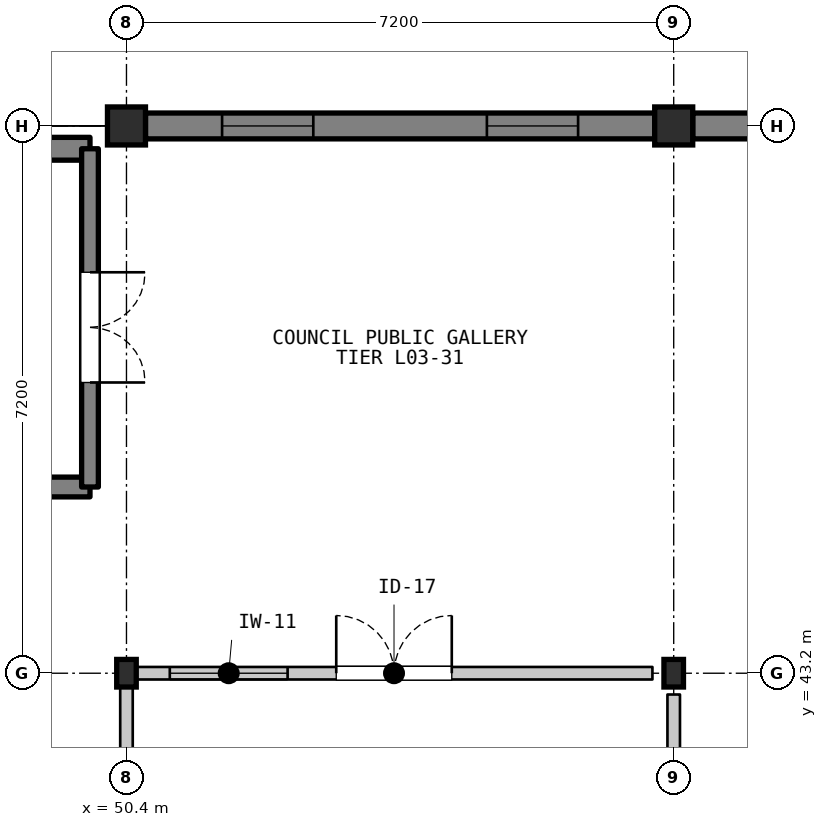
"""IFC4 building model, lengths in metres.
Left out: names, types, materials, properties, quantities, classifications, styles, units other than length and angle.
Written with IfcOpenShell. Run it as: python <this file> out.ifc"""

import sys

from ifc_helpers import new_model, si_unit, direction, frame, frame_2d, origin, origin_2d, place, context, subcontext, project, spatial, rectangle, i_section, extrude, element, fill, save


model = new_model("IFC4")
c1 = context("Model", 3, precision=1e-05, world=origin(), true_north=direction((0.0, 1.0)))
c2 = subcontext(c1, "Body", "Model", "MODEL_VIEW")
j1 = project(units=[si_unit("LENGTHUNIT", "METRE"), si_unit("PLANEANGLEUNIT", "RADIAN")], contexts=[c1])
p1 = place(None, origin())
s1 = spatial("IfcSite", under=j1, at=p1, CompositionType="ELEMENT")
p2 = place(p1, origin())
s2 = spatial("IfcBuilding", under=s1, at=p2, CompositionType="ELEMENT")
p3 = place(p2, frame((0.0, 0.0, 9.9)))
s3 = spatial("IfcBuildingStorey", under=s2, at=p3, CompositionType="ELEMENT", Elevation=9.9)
p4 = place(p3, frame((50.4, 43.2, 0.0), z_axis=(0.0, 0.0, 1.0), x_axis=(1.0, 0.0, 0.0)))
e1 = element("IfcColumn", 1, at=p4, inside=s3, PredefinedType="COLUMN", context=c2, shape_type="SweptSolid", body=[
    extrude(i_section(OverallWidth=0.257, OverallDepth=0.363, WebThickness=0.013, FlangeThickness=0.022, FilletRadius=0.015, at=origin_2d()), origin(), (0.0, 0.0, 1.0), 4.2),
])
p5 = place(p3, frame((50.4, 50.4, 0.0), z_axis=(0.0, 0.0, 1.0), x_axis=(1.0, 0.0, 0.0)))
e2 = element("IfcColumn", 2, at=p5, inside=s3, PredefinedType="COLUMN", context=c2, shape_type="SweptSolid", body=[
    extrude(rectangle(XDim=0.5, YDim=0.5, at=origin_2d()), origin(), (0.0, 0.0, 1.0), 4.2),
])
p6 = place(p3, frame((57.6, 43.2, 0.0), z_axis=(0.0, 0.0, 1.0), x_axis=(1.0, 0.0, 0.0)))
e3 = element("IfcColumn", 3, at=p6, inside=s3, PredefinedType="COLUMN", context=c2, shape_type="SweptSolid", body=[
    extrude(i_section(OverallWidth=0.257, OverallDepth=0.363, WebThickness=0.013, FlangeThickness=0.022, FilletRadius=0.015, at=origin_2d()), origin(), (0.0, 0.0, 1.0), 4.2),
])
p7 = place(p3, frame((57.6, 50.4, 0.0), z_axis=(0.0, 0.0, 1.0), x_axis=(1.0, 0.0, 0.0)))
e4 = element("IfcColumn", 4, at=p7, inside=s3, PredefinedType="COLUMN", context=c2, shape_type="SweptSolid", body=[
    extrude(rectangle(XDim=0.5, YDim=0.5, at=origin_2d()), origin(), (0.0, 0.0, 1.0), 4.2),
])
p8 = place(p3, frame((50.65, 50.4, 0.0), z_axis=(0.0, 0.0, 1.0), x_axis=(1.0, 0.0, 0.0)))
e5 = element("IfcWall", 5, at=p8, inside=s3, PredefinedType="SOLIDWALL", context=c2, shape_type="SweptSolid", body=[
    extrude(rectangle(XDim=6.7, YDim=0.34, at=frame_2d((3.35, 0.0))), origin(), (0.0, 0.0, 1.0), 3.398),
])
p9 = place(p8, frame((1.008, 0.0, 0.95)))
e6 = element("IfcOpeningElement", 6, at=p9, cuts=e5, PredefinedType="OPENING", context=c2, shape_type="SweptSolid", body=[
    extrude(rectangle(XDim=1.2, YDim=1.7, at=frame_2d((0.6, 0.85))), frame((0.0, 0.18, 0.0), z_axis=(0.0, -1.0, 0.0), x_axis=(1.0, 0.0, 0.0)), (0.0, 0.0, 1.0), 0.36),
])
p10 = place(p8, frame((4.492, 0.0, 0.95)))
e7 = element("IfcOpeningElement", 7, at=p10, cuts=e5, PredefinedType="OPENING", context=c2, shape_type="SweptSolid", body=[
    extrude(rectangle(XDim=1.2, YDim=1.7, at=frame_2d((0.6, 0.85))), frame((0.0, 0.18, 0.0), z_axis=(0.0, -1.0, 0.0), x_axis=(1.0, 0.0, 0.0)), (0.0, 0.0, 1.0), 0.36),
])
p11 = place(p3, frame((57.85, 50.4, 0.0), z_axis=(0.0, 0.0, 1.0), x_axis=(1.0, 0.0, 0.0)))
e8 = element("IfcWall", 8, at=p11, inside=s3, PredefinedType="SOLIDWALL", context=c2, shape_type="SweptSolid", body=[
    extrude(rectangle(XDim=6.7, YDim=0.34, at=frame_2d((3.35, 0.0))), origin(), (0.0, 0.0, 1.0), 3.398),
])
p12 = place(p11, frame((1.008, 0.0, 0.95)))
e9 = element("IfcOpeningElement", 9, at=p12, cuts=e8, PredefinedType="OPENING", context=c2, shape_type="SweptSolid", body=[
    extrude(rectangle(XDim=1.2, YDim=1.7, at=frame_2d((0.6, 0.85))), frame((0.0, 0.18, 0.0), z_axis=(0.0, -1.0, 0.0), x_axis=(1.0, 0.0, 0.0)), (0.0, 0.0, 1.0), 0.36),
])
p13 = place(p11, frame((4.492, 0.0, 0.95)))
e10 = element("IfcOpeningElement", 10, at=p13, cuts=e8, PredefinedType="OPENING", context=c2, shape_type="SweptSolid", body=[
    extrude(rectangle(XDim=1.2, YDim=1.7, at=frame_2d((0.6, 0.85))), frame((0.0, 0.18, 0.0), z_axis=(0.0, -1.0, 0.0), x_axis=(1.0, 0.0, 0.0)), (0.0, 0.0, 1.0), 0.36),
])
p14 = place(p3, frame((44.51, 45.65, 0.0), z_axis=(0.0, 0.0, 1.0), x_axis=(1.0, 0.0, 0.0)))
e11 = element("IfcWall", 11, at=p14, inside=s3, PredefinedType="SHEAR", context=c2, shape_type="SweptSolid", body=[
    extrude(rectangle(XDim=5.41, YDim=0.26, at=frame_2d((2.705, 0.0))), origin(), (0.0, 0.0, 1.0), 4.02),
])
p15 = place(p14, frame((2.84, 0.0, 0.0)))
e12 = element("IfcOpeningElement", 12, at=p15, cuts=e11, PredefinedType="OPENING", context=c2, shape_type="SweptSolid", body=[
    extrude(rectangle(XDim=1.15, YDim=2.15, at=frame_2d((0.575, 1.075))), frame((0.0, 0.14, 0.0), z_axis=(0.0, -1.0, 0.0), x_axis=(1.0, 0.0, 0.0)), (0.0, 0.0, 1.0), 0.28),
])
p16 = place(p3, frame((44.0, 50.1, 0.0), z_axis=(0.0, 0.0, 1.0), x_axis=(1.0, 0.0, 0.0)))
e13 = element("IfcWall", 13, at=p16, inside=s3, PredefinedType="SHEAR", context=c2, shape_type="SweptSolid", body=[
    extrude(rectangle(XDim=5.92, YDim=0.3, at=frame_2d((2.96, 0.0))), origin(), (0.0, 0.0, 1.0), 4.02),
])
p17 = place(p3, frame((49.92, 50.1, 0.0), z_axis=(0.0, 0.0, 1.0), x_axis=(0.0, -1.0, 0.0)))
e14 = element("IfcWall", 14, at=p17, inside=s3, PredefinedType="SHEAR", context=c2, shape_type="SweptSolid", body=[
    extrude(rectangle(XDim=4.45, YDim=0.22, at=frame_2d((2.225, 0.0))), origin(), (0.0, 0.0, 1.0), 4.02),
])
p18 = place(p17, frame((1.625, 0.0, 0.0)))
e15 = element("IfcOpeningElement", 15, at=p18, cuts=e14, PredefinedType="OPENING", context=c2, shape_type="SweptSolid", body=[
    extrude(rectangle(XDim=1.45, YDim=2.2, at=frame_2d((0.725, 1.1))), frame((0.0, 0.12, 0.0), z_axis=(0.0, -1.0, 0.0), x_axis=(1.0, 0.0, 0.0)), (0.0, 0.0, 1.0), 0.24),
])
p19 = place(p3, frame((50.52, 43.2, 0.0), z_axis=(0.0, 0.0, 1.0), x_axis=(1.0, 0.0, 0.0)))
e16 = element("IfcWall", 16, at=p19, inside=s3, PredefinedType="PARTITIONING", context=c2, shape_type="SweptSolid", body=[
    extrude(rectangle(XDim=6.8, YDim=0.165, at=frame_2d((3.4, 0.0))), origin(), (0.0, 0.0, 1.0), 3.388),
])
p20 = place(p19, frame((2.64, 0.0, 0.0)))
e17 = element("IfcOpeningElement", 17, at=p20, cuts=e16, PredefinedType="OPENING", context=c2, shape_type="SweptSolid", body=[
    extrude(rectangle(XDim=1.52, YDim=2.4, at=frame_2d((0.76, 1.2))), frame((0.0, 0.093, 0.0), z_axis=(0.0, -1.0, 0.0), x_axis=(1.0, 0.0, 0.0)), (0.0, 0.0, 1.0), 0.185),
])
p21 = place(p19, frame((0.45, 0.0, 1.05)))
e18 = element("IfcOpeningElement", 18, at=p21, cuts=e16, PredefinedType="OPENING", context=c2, shape_type="SweptSolid", body=[
    extrude(rectangle(XDim=1.55, YDim=1.15, at=frame_2d((0.775, 0.575))), frame((0.0, 0.093, 0.0), z_axis=(0.0, -1.0, 0.0), x_axis=(1.0, 0.0, 0.0)), (0.0, 0.0, 1.0), 0.185),
])
p22 = place(p3, frame((50.4, 36.12, 0.0), z_axis=(0.0, 0.0, 1.0), x_axis=(0.0, 1.0, 0.0)))
e19 = element("IfcWall", 19, at=p22, inside=s3, PredefinedType="PARTITIONING", context=c2, shape_type="SweptSolid", body=[
    extrude(rectangle(XDim=6.96, YDim=0.165, at=frame_2d((3.48, 0.0))), origin(), (0.0, 0.0, 1.0), 3.388),
])
p23 = place(p3, frame((57.6, 42.92, 0.0), z_axis=(0.0, 0.0, 1.0), x_axis=(0.0, -1.0, 0.0)))
e20 = element("IfcWall", 20, at=p23, inside=s3, PredefinedType="PARTITIONING", context=c2, shape_type="SweptSolid", body=[
    extrude(rectangle(XDim=6.8, YDim=0.165, at=frame_2d((3.4, 0.0))), origin(), (0.0, 0.0, 1.0), 3.388),
])
p24 = place(p9, origin())
e21 = element("IfcWindow", 21, at=p24, inside=s3, PartitioningType="SINGLE_PANEL", PredefinedType="WINDOW", context=c2, shape_type="SweptSolid", body=[
    extrude(rectangle(XDim=1.2, YDim=1.7, at=frame_2d((0.6, 0.85))), frame((0.0, 0.03, 0.0), z_axis=(0.0, -1.0, 0.0), x_axis=(1.0, 0.0, 0.0)), (0.0, 0.0, 1.0), 0.06),
])
fill(e6, e21)
p25 = place(p10, origin())
e22 = element("IfcWindow", 22, at=p25, inside=s3, PartitioningType="SINGLE_PANEL", PredefinedType="WINDOW", context=c2, shape_type="SweptSolid", body=[
    extrude(rectangle(XDim=1.2, YDim=1.7, at=frame_2d((0.6, 0.85))), frame((0.0, 0.03, 0.0), z_axis=(0.0, -1.0, 0.0), x_axis=(1.0, 0.0, 0.0)), (0.0, 0.0, 1.0), 0.06),
])
fill(e7, e22)
p26 = place(p18, origin())
e23 = element("IfcDoor", 23, at=p26, inside=s3, OperationType="DOUBLE_DOOR_SINGLE_SWING", PredefinedType="DOOR", context=c2, shape_type="SweptSolid", body=[
    extrude(rectangle(XDim=1.45, YDim=2.2, at=frame_2d((0.725, 1.1))), frame((0.0, 0.025, 0.0), z_axis=(0.0, -1.0, 0.0), x_axis=(1.0, 0.0, 0.0)), (0.0, 0.0, 1.0), 0.05),
])
fill(e15, e23)
p27 = place(p20, origin())
e24 = element("IfcDoor", 24, at=p27, inside=s3, OperationType="DOUBLE_DOOR_SINGLE_SWING", PredefinedType="DOOR", context=c2, shape_type="SweptSolid", body=[
    extrude(rectangle(XDim=1.52, YDim=2.4, at=frame_2d((0.76, 1.2))), frame((0.0, 0.025, 0.0), z_axis=(0.0, -1.0, 0.0), x_axis=(1.0, 0.0, 0.0)), (0.0, 0.0, 1.0), 0.05),
])
fill(e17, e24)
p28 = place(p21, origin())
e25 = element("IfcWindow", 25, at=p28, inside=s3, PartitioningType="SINGLE_PANEL", PredefinedType="WINDOW", context=c2, shape_type="SweptSolid", body=[
    extrude(rectangle(XDim=1.55, YDim=1.15, at=frame_2d((0.775, 0.575))), frame((0.0, 0.03, 0.0), z_axis=(0.0, -1.0, 0.0), x_axis=(1.0, 0.0, 0.0)), (0.0, 0.0, 1.0), 0.06),
])
fill(e18, e25)
save(model, sys.argv[1])
